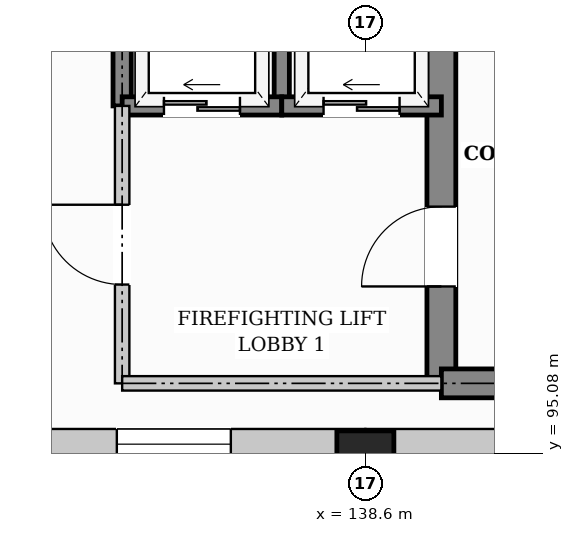
"""IFC4 building model, lengths in metres.
Left out: names, types, materials, properties, quantities, classifications, styles, units other than length and angle.
Written with IfcOpenShell. Run it as: python <this file> out.ifc"""

import sys

from ifc_helpers import new_model, si_unit, direction, frame, frame_2d, origin, origin_2d, place, context, subcontext, project, spatial, rectangle, extrude, element, fill, save


model = new_model("IFC4")
c1 = context("Model", 3, precision=1e-05, world=origin(), true_north=direction((0.0, 1.0)))
c2 = subcontext(c1, "Body", "Model", "MODEL_VIEW")
j1 = project(units=[si_unit("LENGTHUNIT", "METRE"), si_unit("PLANEANGLEUNIT", "RADIAN")], contexts=[c1])
p1 = place(None, origin())
s1 = spatial("IfcSite", under=j1, at=p1, CompositionType="ELEMENT")
p2 = place(p1, origin())
s2 = spatial("IfcBuilding", under=s1, at=p2, CompositionType="ELEMENT")
p3 = place(p2, frame((0.0, 0.0, 13.2)))
s3 = spatial("IfcBuildingStorey", under=s2, at=p3, CompositionType="ELEMENT", Elevation=13.2)
p4 = place(p3, frame((138.6, 95.0, 0.0), z_axis=(0.0, 0.0, 1.0), x_axis=(1.0, 0.0, 0.0)))
e1 = element("IfcColumn", 1, at=p4, inside=s3, PredefinedType="COLUMN", context=c2, shape_type="SweptSolid", body=[
    extrude(rectangle(XDim=0.75, YDim=0.75, at=origin_2d()), origin(), (0.0, 0.0, 1.0), 3.6),
])
p5 = place(p3, frame((147.6, 95.2, 0.0), z_axis=(0.0, 0.0, 1.0), x_axis=(-1.0, 0.0, 0.0)))
e2 = element("IfcWall", 2, at=p5, inside=s3, PredefinedType="SOLIDWALL", context=c2, shape_type="SweptSolid", body=[
    extrude(rectangle(XDim=9.0, YDim=0.4, at=frame_2d((4.5, 0.0))), origin(), (0.0, 0.0, 1.0), 2.6),
])
p6 = place(p5, frame((1.77, 0.0, 0.75)))
e3 = element("IfcOpeningElement", 3, at=p6, cuts=e2, PredefinedType="OPENING", context=c2, shape_type="SweptSolid", body=[
    extrude(rectangle(XDim=1.5, YDim=1.6, at=frame_2d((0.75, 0.8))), frame((0.0, 0.21, 0.0), z_axis=(0.0, -1.0, 0.0), x_axis=(1.0, 0.0, 0.0)), (0.0, 0.0, 1.0), 0.42),
])
p7 = place(p5, frame((5.73, 0.0, 0.75)))
e4 = element("IfcOpeningElement", 4, at=p7, cuts=e2, PredefinedType="OPENING", context=c2, shape_type="SweptSolid", body=[
    extrude(rectangle(XDim=1.5, YDim=1.6, at=frame_2d((0.75, 0.8))), frame((0.0, 0.21, 0.0), z_axis=(0.0, -1.0, 0.0), x_axis=(1.0, 0.0, 0.0)), (0.0, 0.0, 1.0), 0.42),
])
p8 = place(p3, frame((138.6, 95.2, 0.0), z_axis=(0.0, 0.0, 1.0), x_axis=(-1.0, 0.0, 0.0)))
e5 = element("IfcWall", 5, at=p8, inside=s3, PredefinedType="SOLIDWALL", context=c2, shape_type="SweptSolid", body=[
    extrude(rectangle(XDim=9.0, YDim=0.4, at=frame_2d((4.5, 0.0))), origin(), (0.0, 0.0, 1.0), 2.57),
])
p9 = place(p8, frame((1.77, 0.0, 0.75)))
e6 = element("IfcOpeningElement", 6, at=p9, cuts=e5, PredefinedType="OPENING", context=c2, shape_type="SweptSolid", body=[
    extrude(rectangle(XDim=1.5, YDim=1.6, at=frame_2d((0.75, 0.8))), frame((0.0, 0.21, 0.0), z_axis=(0.0, -1.0, 0.0), x_axis=(1.0, 0.0, 0.0)), (0.0, 0.0, 1.0), 0.42),
])
p10 = place(p8, frame((5.73, 0.0, 0.75)))
e7 = element("IfcOpeningElement", 7, at=p10, cuts=e5, PredefinedType="OPENING", context=c2, shape_type="SweptSolid", body=[
    extrude(rectangle(XDim=1.5, YDim=1.6, at=frame_2d((0.75, 0.8))), frame((0.0, 0.21, 0.0), z_axis=(0.0, -1.0, 0.0), x_axis=(1.0, 0.0, 0.0)), (0.0, 0.0, 1.0), 0.42),
])
p11 = place(p3, frame((139.6, 96.0, 0.0), z_axis=(0.0, 0.0, 1.0), x_axis=(0.0, 1.0, 0.0)))
e8 = element("IfcWall", 8, at=p11, inside=s3, PredefinedType="SHEAR", context=c2, shape_type="SweptSolid", body=[
    extrude(rectangle(XDim=6.0, YDim=0.38, at=frame_2d((3.0, 0.0))), origin(), (0.0, 0.0, 1.0), 3.32),
])
p12 = place(p11, frame((1.275, 0.0, 0.0)))
e9 = element("IfcOpeningElement", 9, at=p12, cuts=e8, PredefinedType="OPENING", context=c2, shape_type="SweptSolid", body=[
    extrude(rectangle(XDim=1.05, YDim=2.15, at=frame_2d((0.525, 1.075))), frame((0.0, 0.2, 0.0), z_axis=(0.0, -1.0, 0.0), x_axis=(1.0, 0.0, 0.0)), (0.0, 0.0, 1.0), 0.4),
])
p13 = place(p3, frame((139.6, 96.0, 0.0), z_axis=(0.0, 0.0, 1.0), x_axis=(1.0, 0.0, 0.0)))
e10 = element("IfcWall", 10, at=p13, inside=s3, PredefinedType="SHEAR", context=c2, shape_type="SweptSolid", body=[
    extrude(rectangle(XDim=7.0, YDim=0.38, at=frame_2d((3.5, 0.0))), origin(), (0.0, 0.0, 1.0), 3.32),
])
p14 = place(p3, frame((135.4, 99.65, 0.0), z_axis=(0.0, 0.0, 1.0), x_axis=(0.0, 1.0, 0.0)))
e11 = element("IfcWall", 11, at=p14, inside=s3, PredefinedType="SHEAR", context=c2, shape_type="SweptSolid", body=[
    extrude(rectangle(XDim=2.35, YDim=0.24, at=frame_2d((1.175, 0.0))), origin(), (0.0, 0.0, 1.0), 3.32),
])
p15 = place(p3, frame((137.5, 99.65, 0.0), z_axis=(0.0, 0.0, 1.0), x_axis=(0.0, 1.0, 0.0)))
e12 = element("IfcWall", 12, at=p15, inside=s3, PredefinedType="SHEAR", context=c2, shape_type="SweptSolid", body=[
    extrude(rectangle(XDim=2.35, YDim=0.2, at=frame_2d((1.175, 0.0))), origin(), (0.0, 0.0, 1.0), 3.32),
])
p16 = place(p3, frame((135.4, 99.65, 0.0), z_axis=(0.0, 0.0, 1.0), x_axis=(1.0, 0.0, 0.0)))
e13 = element("IfcWall", 13, at=p16, inside=s3, PredefinedType="SHEAR", context=c2, shape_type="SweptSolid", body=[
    extrude(rectangle(XDim=2.1, YDim=0.24, at=frame_2d((1.05, 0.0))), origin(), (0.0, 0.0, 1.0), 3.32),
])
p17 = place(p16, frame((0.55, 0.0, 0.0)))
e14 = element("IfcOpeningElement", 14, at=p17, cuts=e13, PredefinedType="OPENING", context=c2, shape_type="SweptSolid", body=[
    extrude(rectangle(XDim=1.0, YDim=2.1, at=frame_2d((0.5, 1.05))), frame((0.0, 0.13, 0.0), z_axis=(0.0, -1.0, 0.0), x_axis=(1.0, 0.0, 0.0)), (0.0, 0.0, 1.0), 0.26),
])
p18 = place(p3, frame((137.5, 99.65, 0.0), z_axis=(0.0, 0.0, 1.0), x_axis=(1.0, 0.0, 0.0)))
e15 = element("IfcWall", 15, at=p18, inside=s3, PredefinedType="SHEAR", context=c2, shape_type="SweptSolid", body=[
    extrude(rectangle(XDim=2.1, YDim=0.24, at=frame_2d((1.05, 0.0))), origin(), (0.0, 0.0, 1.0), 3.32),
])
p19 = place(p18, frame((0.55, 0.0, 0.0)))
e16 = element("IfcOpeningElement", 16, at=p19, cuts=e15, PredefinedType="OPENING", context=c2, shape_type="SweptSolid", body=[
    extrude(rectangle(XDim=1.0, YDim=2.1, at=frame_2d((0.5, 1.05))), frame((0.0, 0.13, 0.0), z_axis=(0.0, -1.0, 0.0), x_axis=(1.0, 0.0, 0.0)), (0.0, 0.0, 1.0), 0.26),
])
p20 = place(p3, frame((135.4, 96.0, 0.0), z_axis=(0.0, 0.0, 1.0), x_axis=(0.0, 1.0, 0.0)))
e17 = element("IfcWall", 17, at=p20, inside=s3, PredefinedType="PARTITIONING", context=c2, shape_type="SweptSolid", body=[
    extrude(rectangle(XDim=3.65, YDim=0.19, at=frame_2d((1.825, 0.0))), origin(), (0.0, 0.0, 1.0), 3.32),
])
p21 = place(p20, frame((1.3, 0.0, 0.0)))
e18 = element("IfcOpeningElement", 18, at=p21, cuts=e17, PredefinedType="OPENING", context=c2, shape_type="SweptSolid", body=[
    extrude(rectangle(XDim=1.05, YDim=2.15, at=frame_2d((0.525, 1.075))), frame((0.0, 0.105, 0.0), z_axis=(0.0, -1.0, 0.0), x_axis=(1.0, 0.0, 0.0)), (0.0, 0.0, 1.0), 0.21),
])
p22 = place(p3, frame((135.4, 96.0, 0.0), z_axis=(0.0, 0.0, 1.0), x_axis=(1.0, 0.0, 0.0)))
e19 = element("IfcWall", 19, at=p22, inside=s3, PredefinedType="PARTITIONING", context=c2, shape_type="SweptSolid", body=[
    extrude(rectangle(XDim=4.2, YDim=0.19, at=frame_2d((2.1, 0.0))), origin(), (0.0, 0.0, 1.0), 3.32),
])
p23 = place(p9, origin())
e20 = element("IfcWindow", 20, at=p23, inside=s3, PartitioningType="DOUBLE_PANEL_HORIZONTAL", PredefinedType="WINDOW", context=c2, shape_type="SweptSolid", body=[
    extrude(rectangle(XDim=1.5, YDim=1.6, at=frame_2d((0.75, 0.8))), frame((0.0, 0.03, 0.0), z_axis=(0.0, -1.0, 0.0), x_axis=(1.0, 0.0, 0.0)), (0.0, 0.0, 1.0), 0.06),
])
fill(e6, e20)
p24 = place(p12, origin())
e21 = element("IfcDoor", 21, at=p24, inside=s3, OperationType="SINGLE_SWING_LEFT", PredefinedType="DOOR", context=c2, shape_type="SweptSolid", body=[
    extrude(rectangle(XDim=1.05, YDim=2.15, at=frame_2d((0.525, 1.075))), frame((0.0, 0.025, 0.0), z_axis=(0.0, -1.0, 0.0), x_axis=(1.0, 0.0, 0.0)), (0.0, 0.0, 1.0), 0.05),
])
fill(e9, e21)
p25 = place(p17, origin())
e22 = element("IfcDoor", 22, at=p25, inside=s3, OperationType="SLIDING_TO_LEFT", PredefinedType="DOOR", context=c2, shape_type="SweptSolid", body=[
    extrude(rectangle(XDim=1.0, YDim=2.1, at=frame_2d((0.5, 1.05))), frame((0.0, 0.025, 0.0), z_axis=(0.0, -1.0, 0.0), x_axis=(1.0, 0.0, 0.0)), (0.0, 0.0, 1.0), 0.05),
])
fill(e14, e22)
p26 = place(p19, origin())
e23 = element("IfcDoor", 23, at=p26, inside=s3, OperationType="SLIDING_TO_LEFT", PredefinedType="DOOR", context=c2, shape_type="SweptSolid", body=[
    extrude(rectangle(XDim=1.0, YDim=2.1, at=frame_2d((0.5, 1.05))), frame((0.0, 0.025, 0.0), z_axis=(0.0, -1.0, 0.0), x_axis=(1.0, 0.0, 0.0)), (0.0, 0.0, 1.0), 0.05),
])
fill(e16, e23)
p27 = place(p21, origin())
e24 = element("IfcDoor", 24, at=p27, inside=s3, OperationType="SINGLE_SWING_RIGHT", PredefinedType="DOOR", context=c2, shape_type="SweptSolid", body=[
    extrude(rectangle(XDim=1.05, YDim=2.15, at=frame_2d((0.525, 1.075))), frame((0.0, 0.025, 0.0), z_axis=(0.0, -1.0, 0.0), x_axis=(1.0, 0.0, 0.0)), (0.0, 0.0, 1.0), 0.05),
])
fill(e18, e24)
save(model, sys.argv[1])
